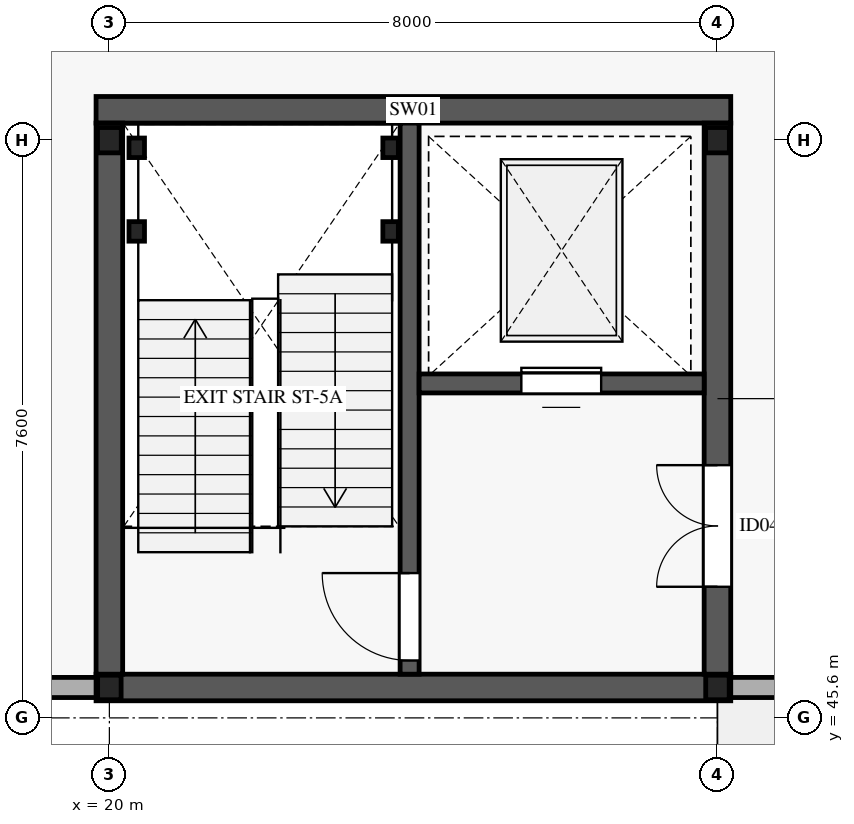
"""IFC4 building model, lengths in metres.
Left out: names, types, materials, properties, quantities, classifications, styles, units other than length and angle.
Written with IfcOpenShell. Run it as: python <this file> out.ifc"""

import sys

from ifc_helpers import new_model, si_unit, direction, frame, frame_2d, origin, origin_2d, place, context, subcontext, project, spatial, rectangle, i_section, extrude, element, fill, save


model = new_model("IFC4")
c1 = context("Model", 3, precision=1e-05, world=origin(), true_north=direction((0.0, 1.0)))
c2 = subcontext(c1, "Body", "Model", "MODEL_VIEW")
j1 = project(units=[si_unit("LENGTHUNIT", "METRE"), si_unit("PLANEANGLEUNIT", "RADIAN")], contexts=[c1])
p1 = place(None, origin())
s1 = spatial("IfcSite", under=j1, at=p1, CompositionType="ELEMENT")
p2 = place(p1, origin())
s2 = spatial("IfcBuilding", under=s1, at=p2, CompositionType="ELEMENT")
p3 = place(p2, frame((0.0, 0.0, 20.4)))
s3 = spatial("IfcBuildingStorey", under=s2, at=p3, CompositionType="ELEMENT", Elevation=20.4)
p4 = place(p3, frame((20.0, 46.0, 0.0), z_axis=(0.0, 0.0, 1.0), x_axis=(1.0, 0.0, 0.0)))
e1 = element("IfcColumn", 1, at=p4, inside=s3, PredefinedType="COLUMN", context=c2, shape_type="SweptSolid", body=[
    extrude(i_section(OverallWidth=0.309, OverallDepth=0.323, WebThickness=0.014, FlangeThickness=0.023, FilletRadius=0.015, at=origin_2d()), origin(), (0.0, 0.0, 1.0), 4.595),
])
p5 = place(p3, frame((20.0, 53.2, 0.0), z_axis=(0.0, 0.0, 1.0), x_axis=(1.0, 0.0, 0.0)))
e2 = element("IfcColumn", 2, at=p5, inside=s3, PredefinedType="COLUMN", context=c2, shape_type="SweptSolid", body=[
    extrude(i_section(OverallWidth=0.313, OverallDepth=0.333, WebThickness=0.018, FlangeThickness=0.028, FilletRadius=0.015, at=origin_2d()), origin(), (0.0, 0.0, 1.0), 4.595),
])
p6 = place(p3, frame((28.0, 46.0, 0.0), z_axis=(0.0, 0.0, 1.0), x_axis=(1.0, 0.0, 0.0)))
e3 = element("IfcColumn", 3, at=p6, inside=s3, PredefinedType="COLUMN", context=c2, shape_type="SweptSolid", body=[
    extrude(i_section(OverallWidth=0.309, OverallDepth=0.323, WebThickness=0.014, FlangeThickness=0.023, FilletRadius=0.015, at=origin_2d()), origin(), (0.0, 0.0, 1.0), 4.595),
])
p7 = place(p3, frame((28.0, 53.2, 0.0), z_axis=(0.0, 0.0, 1.0), x_axis=(1.0, 0.0, 0.0)))
e4 = element("IfcColumn", 4, at=p7, inside=s3, PredefinedType="COLUMN", context=c2, shape_type="SweptSolid", body=[
    extrude(i_section(OverallWidth=0.313, OverallDepth=0.333, WebThickness=0.018, FlangeThickness=0.028, FilletRadius=0.015, at=origin_2d()), origin(), (0.0, 0.0, 1.0), 4.595),
])
p8 = place(p3, frame((36.02, 46.0, 0.0), z_axis=(0.0, 0.0, 1.0), x_axis=(-1.0, 0.0, 0.0)))
e5 = element("IfcWall", 5, at=p8, inside=s3, PredefinedType="STANDARD", context=c2, shape_type="SweptSolid", body=[
    extrude(rectangle(XDim=8.04, YDim=0.265, at=frame_2d((4.02, 0.0))), origin(), (0.0, 0.0, 1.0), 3.66),
])
p9 = place(p8, frame((2.795, 0.0, 0.75)))
e6 = element("IfcOpeningElement", 6, at=p9, cuts=e5, PredefinedType="OPENING", context=c2, shape_type="SweptSolid", body=[
    extrude(rectangle(XDim=2.45, YDim=1.55, at=frame_2d((1.225, 0.775))), frame((0.0, 0.142, 0.0), z_axis=(0.0, -1.0, 0.0), x_axis=(1.0, 0.0, 0.0)), (0.0, 0.0, 1.0), 0.285),
])
p10 = place(p3, frame((20.02, 46.0, 0.0), z_axis=(0.0, 0.0, 1.0), x_axis=(-1.0, 0.0, 0.0)))
e7 = element("IfcWall", 7, at=p10, inside=s3, PredefinedType="STANDARD", context=c2, shape_type="SweptSolid", body=[
    extrude(rectangle(XDim=8.04, YDim=0.265, at=frame_2d((4.02, 0.0))), origin(), (0.0, 0.0, 1.0), 3.66),
])
p11 = place(p10, frame((2.595, 0.0, 0.75)))
e8 = element("IfcOpeningElement", 8, at=p11, cuts=e7, PredefinedType="OPENING", context=c2, shape_type="SweptSolid", body=[
    extrude(rectangle(XDim=2.85, YDim=1.55, at=frame_2d((1.425, 0.775))), frame((0.0, 0.142, 0.0), z_axis=(0.0, -1.0, 0.0), x_axis=(1.0, 0.0, 0.0)), (0.0, 0.0, 1.0), 0.285),
])
for number, where, z_axis, x_axis in (
    (9, (19.825, 46.0, 0.0), (0.0, 0.0, 1.0), (1.0, 0.0, 0.0)),
    (10, (19.825, 53.6, 0.0), (0.0, 0.0, 1.0), (1.0, 0.0, 0.0)),
):
    element("IfcWall", number, at=place(p3, frame(where, z_axis=z_axis, x_axis=x_axis)), inside=s3, PredefinedType="SHEAR", context=c2, shape_type="SweptSolid", body=[
        extrude(rectangle(XDim=8.35, YDim=0.35, at=frame_2d((4.175, 0.0))), origin(), (0.0, 0.0, 1.0), 4.59),
    ])
p12 = place(p3, frame((20.0, 46.175, 0.0), z_axis=(0.0, 0.0, 1.0), x_axis=(0.0, 1.0, 0.0)))
e11 = element("IfcWall", 11, at=p12, inside=s3, PredefinedType="SHEAR", context=c2, shape_type="SweptSolid", body=[
    extrude(rectangle(XDim=7.25, YDim=0.35, at=frame_2d((3.625, 0.0))), origin(), (0.0, 0.0, 1.0), 4.59),
])
p13 = place(p3, frame((28.0, 46.175, 0.0), z_axis=(0.0, 0.0, 1.0), x_axis=(0.0, 1.0, 0.0)))
e12 = element("IfcWall", 12, at=p13, inside=s3, PredefinedType="SHEAR", context=c2, shape_type="SweptSolid", body=[
    extrude(rectangle(XDim=7.25, YDim=0.35, at=frame_2d((3.625, 0.0))), origin(), (0.0, 0.0, 1.0), 4.59),
])
p14 = place(p13, frame((1.15, 0.0, 0.0)))
e13 = element("IfcOpeningElement", 13, at=p14, cuts=e12, PredefinedType="OPENING", context=c2, shape_type="SweptSolid", body=[
    extrude(rectangle(XDim=1.6, YDim=2.35, at=frame_2d((0.8, 1.175))), frame((0.0, 0.185, 0.0), z_axis=(0.0, -1.0, 0.0), x_axis=(1.0, 0.0, 0.0)), (0.0, 0.0, 1.0), 0.37),
])
p15 = place(p3, frame((23.95, 46.175, 0.0), z_axis=(0.0, 0.0, 1.0), x_axis=(0.0, 1.0, 0.0)))
e14 = element("IfcWall", 14, at=p15, inside=s3, PredefinedType="SHEAR", context=c2, shape_type="SweptSolid", body=[
    extrude(rectangle(XDim=7.25, YDim=0.25, at=frame_2d((3.625, 0.0))), origin(), (0.0, 0.0, 1.0), 4.59),
])
p16 = place(p15, frame((0.18, 0.0, 0.0)))
e15 = element("IfcOpeningElement", 15, at=p16, cuts=e14, PredefinedType="OPENING", context=c2, shape_type="SweptSolid", body=[
    extrude(rectangle(XDim=1.15, YDim=2.2, at=frame_2d((0.575, 1.1))), frame((0.0, 0.135, 0.0), z_axis=(0.0, -1.0, 0.0), x_axis=(1.0, 0.0, 0.0)), (0.0, 0.0, 1.0), 0.27),
])
p17 = place(p3, frame((24.075, 50.0, 0.0), z_axis=(0.0, 0.0, 1.0), x_axis=(1.0, 0.0, 0.0)))
e16 = element("IfcWall", 16, at=p17, inside=s3, PredefinedType="SHEAR", context=c2, shape_type="SweptSolid", body=[
    extrude(rectangle(XDim=3.75, YDim=0.25, at=frame_2d((1.875, 0.0))), origin(), (0.0, 0.0, 1.0), 4.59),
])
p18 = place(p17, frame((1.345, 0.0, 0.0)))
e17 = element("IfcOpeningElement", 17, at=p18, cuts=e16, PredefinedType="OPENING", context=c2, shape_type="SweptSolid", body=[
    extrude(rectangle(XDim=1.05, YDim=2.2, at=frame_2d((0.525, 1.1))), frame((0.0, 0.135, 0.0), z_axis=(0.0, -1.0, 0.0), x_axis=(1.0, 0.0, 0.0)), (0.0, 0.0, 1.0), 0.27),
])
for number, where, z_axis, x_axis in (
    (18, (20.36, 52.0, 0.0), (0.0, 0.0, 1.0), (1.0, 0.0, 0.0)),
    (19, (23.7, 52.0, 0.0), (0.0, 0.0, 1.0), (1.0, 0.0, 0.0)),
    (20, (20.36, 53.1, 0.0), (0.0, 0.0, 1.0), (1.0, 0.0, 0.0)),
    (21, (23.7, 53.1, 0.0), (0.0, 0.0, 1.0), (1.0, 0.0, 0.0)),
):
    element("IfcColumn", number, at=place(p3, frame(where, z_axis=z_axis, x_axis=x_axis)), inside=s3, PredefinedType="COLUMN", context=c2, shape_type="SweptSolid", body=[
        extrude(i_section(OverallWidth=0.204, OverallDepth=0.257, WebThickness=0.009, FlangeThickness=0.016, FilletRadius=0.013, at=origin_2d()), origin(), (0.0, 0.0, 1.0), 4.795),
    ])
p19 = place(p16, origin())
e22 = element("IfcDoor", 22, at=p19, inside=s3, OperationType="SINGLE_SWING_RIGHT", PredefinedType="DOOR", context=c2, shape_type="SweptSolid", body=[
    extrude(rectangle(XDim=1.15, YDim=2.2, at=frame_2d((0.575, 1.1))), frame((0.0, 0.025, 0.0), z_axis=(0.0, -1.0, 0.0), x_axis=(1.0, 0.0, 0.0)), (0.0, 0.0, 1.0), 0.05),
])
fill(e15, e22)
p20 = place(p14, origin())
e23 = element("IfcDoor", 23, at=p20, inside=s3, OperationType="DOUBLE_DOOR_SINGLE_SWING", PredefinedType="DOOR", context=c2, shape_type="SweptSolid", body=[
    extrude(rectangle(XDim=1.6, YDim=2.35, at=frame_2d((0.8, 1.175))), frame((0.0, 0.025, 0.0), z_axis=(0.0, -1.0, 0.0), x_axis=(1.0, 0.0, 0.0)), (0.0, 0.0, 1.0), 0.05),
])
fill(e13, e23)
p21 = place(p18, origin())
e24 = element("IfcDoor", 24, at=p21, inside=s3, OperationType="SLIDING_TO_RIGHT", PredefinedType="DOOR", context=c2, shape_type="SweptSolid", body=[
    extrude(rectangle(XDim=1.05, YDim=2.2, at=frame_2d((0.525, 1.1))), frame((0.0, 0.025, 0.0), z_axis=(0.0, -1.0, 0.0), x_axis=(1.0, 0.0, 0.0)), (0.0, 0.0, 1.0), 0.05),
])
fill(e17, e24)
save(model, sys.argv[1])
